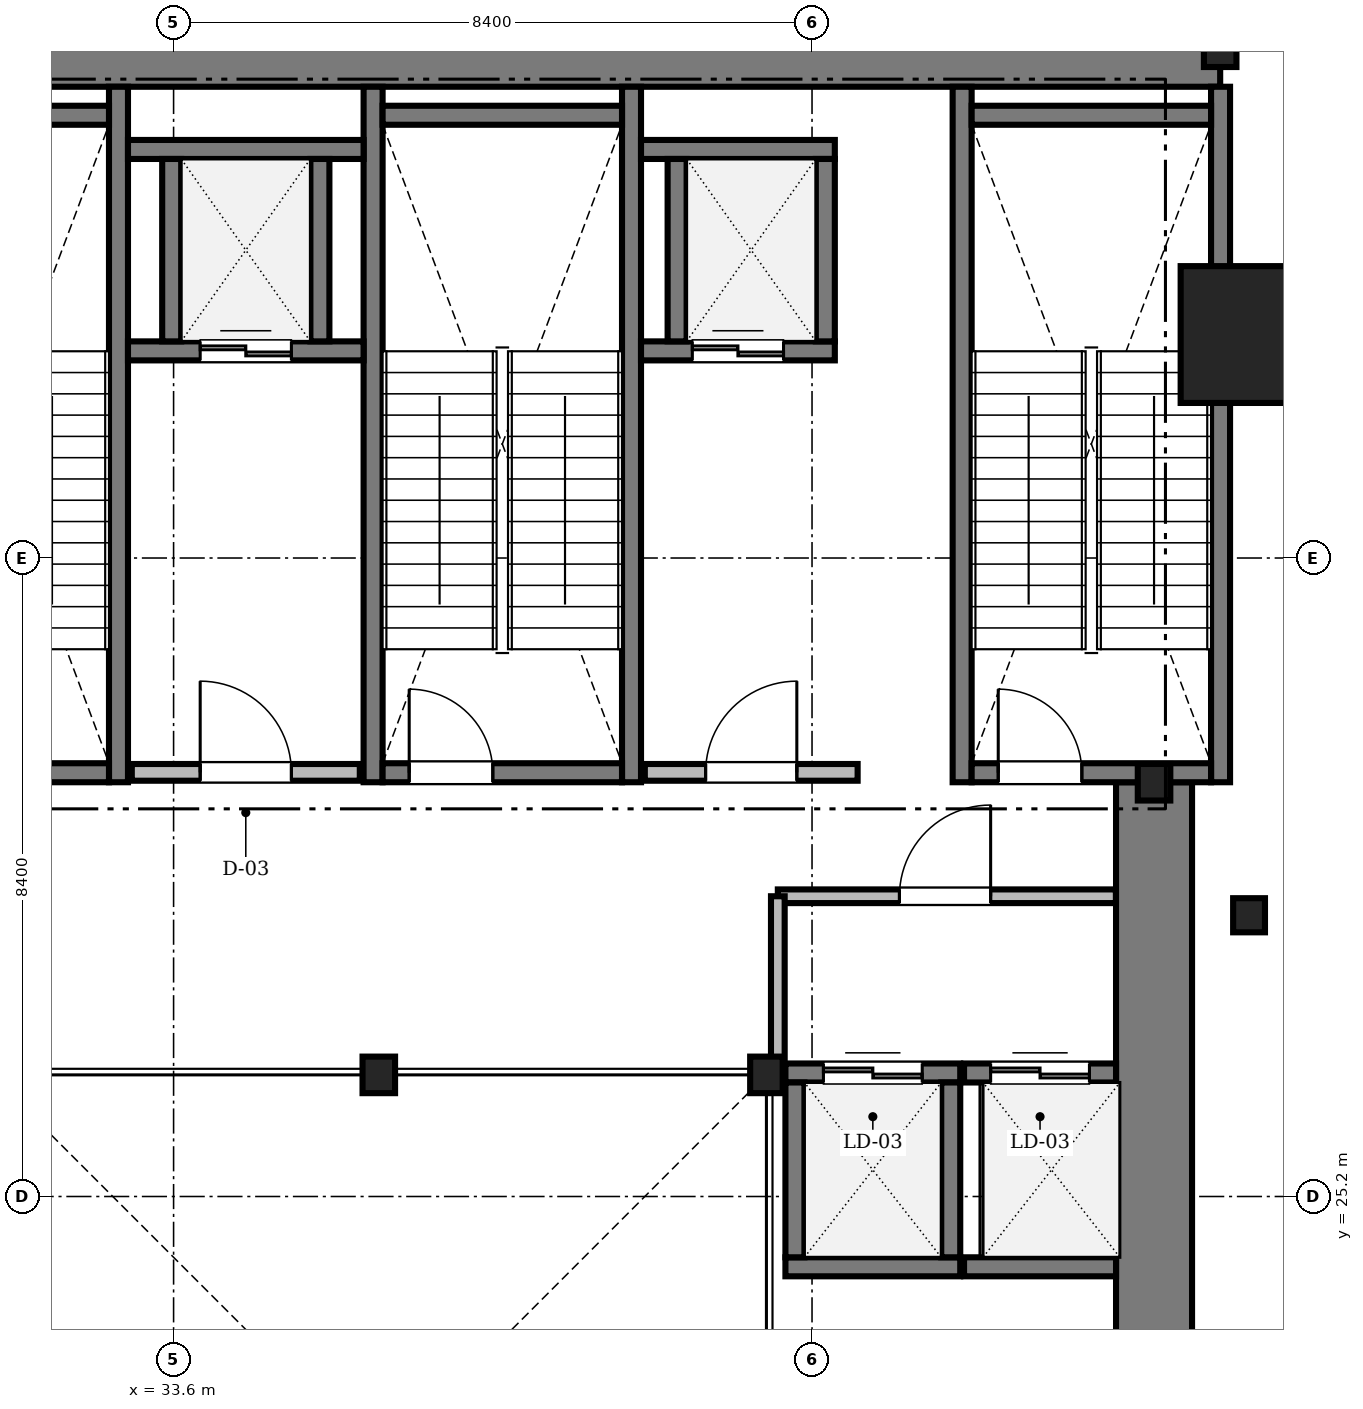
"""IFC4 building model, lengths in metres.
Left out: names, types, materials, properties, quantities, classifications, styles, units other than length and angle.
Written with IfcOpenShell. Run it as: python <this file> out.ifc"""

import sys

from ifc_helpers import new_model, si_unit, direction, frame, frame_2d, origin, origin_2d, place, context, subcontext, project, spatial, rectangle, i_section, extrude, source, transform, mapped, element, fill, save


model = new_model("IFC4")
c1 = context("Model", 3, precision=1e-05, world=origin(), true_north=direction((0.0, 1.0)))
c2 = subcontext(c1, "Body", "Model", "MODEL_VIEW")
j1 = project(units=[si_unit("LENGTHUNIT", "METRE"), si_unit("PLANEANGLEUNIT", "RADIAN")], contexts=[c1])
p1 = place(None, origin())
s1 = spatial("IfcSite", under=j1, at=p1, CompositionType="ELEMENT")
p2 = place(p1, origin())
s2 = spatial("IfcBuilding", under=s1, at=p2, CompositionType="ELEMENT")
p3 = place(p2, frame((0.0, 0.0, 93.3)))
s3 = spatial("IfcBuildingStorey", under=s2, at=p3, CompositionType="ELEMENT", Elevation=93.3)
m1 = source(origin(), c2, "Body", "SweptSolid", [
    extrude(rectangle(XDim=17.52, YDim=1.0, at=frame_2d((8.76, 0.0))), origin(), (0.0, 0.0, 1.0), 4.75),
])
p4 = place(p3, frame((29.85, 40.3, 0.0), z_axis=(0.0, 0.0, 1.0), x_axis=(1.0, 0.0, 0.0)))
e1 = element("IfcWall", 1, at=p4, inside=s3, PredefinedType="SHEAR", context=c2, shape_type="MappedRepresentation", body=[
    mapped(m1, transform((0.0, 0.0, 0.0), scale=1.0)),
])
m2 = source(origin(), c2, "Body", "SweptSolid", [
    extrude(rectangle(XDim=13.15, YDim=1.0, at=frame_2d((6.575, 0.0))), origin(), (0.0, 0.0, 1.0), 4.75),
])
p5 = place(p3, frame((46.5, 17.5, 0.0), z_axis=(0.0, 0.0, 1.0), x_axis=(0.0, 1.0, 0.0)))
e2 = element("IfcWall", 2, at=p5, inside=s3, PredefinedType="SHEAR", context=c2, shape_type="MappedRepresentation", body=[
    mapped(m2, transform((0.0, 0.0, 0.0), scale=1.0)),
])
m3 = source(origin(), c2, "Body", "SweptSolid", [
    extrude(i_section(OverallWidth=0.428, OverallDepth=0.481, WebThickness=0.04, FlangeThickness=0.063, FilletRadius=0.015, at=origin_2d()), origin(), (0.0, 0.0, 1.0), 4.75),
])
for number, where, z_axis, x_axis in (
    (3, (41.4, 26.8, 0.0), (0.0, 0.0, 1.0), (1.0, 0.0, 0.0)),
    (4, (36.3, 26.8, 0.0), (0.0, 0.0, 1.0), (1.0, 0.0, 0.0)),
    (5, (46.5, 30.65, 0.0), (0.0, 0.0, 1.0), (1.0, 0.0, 0.0)),
    (6, (47.37, 40.3, 0.0), (0.0, 0.0, 1.0), (1.0, 0.0, 0.0)),
):
    element("IfcColumn", number, at=place(p3, frame(where, z_axis=z_axis, x_axis=x_axis)), inside=s3, PredefinedType="COLUMN", context=c2, shape_type="MappedRepresentation", body=[
        mapped(m3, transform((0.0, 0.0, 0.0), scale=1.0)),
    ])
m4 = source(origin(), c2, "Body", "SweptSolid", [
    extrude(rectangle(XDim=1.8, YDim=1.8, at=origin_2d()), origin(), (0.0, 0.0, 1.0), 6.543),
])
p6 = place(p3, frame((47.75, 36.54, 0.0), z_axis=(0.687744647911, 0.0, 0.725952683906), x_axis=(0.0, 1.0, 0.0)))
e7 = element("IfcColumn", 7, at=p6, inside=s3, PredefinedType="COLUMN", context=c2, shape_type="MappedRepresentation", body=[
    mapped(m4, transform((0.0, 0.0, 0.0), scale=1.0)),
])
m5 = source(origin(), c2, "Body", "SweptSolid", [
    extrude(i_section(OverallWidth=0.419, OverallDepth=0.449, WebThickness=0.031, FlangeThickness=0.048, FilletRadius=0.015, at=origin_2d()), origin(), (0.0, 0.0, 1.0), 6.543),
])
p7 = place(p3, frame((47.75, 28.9, 0.0), z_axis=(0.687744647911, 0.0, 0.725952683906), x_axis=(0.0, 1.0, 0.0)))
e8 = element("IfcColumn", 8, at=p7, inside=s3, PredefinedType="COLUMN", context=c2, shape_type="MappedRepresentation", body=[
    mapped(m5, transform((0.0, 0.0, 0.0), scale=1.0)),
])
m6 = source(origin(), c2, "Body", "SweptSolid", [
    extrude(rectangle(XDim=9.15, YDim=0.25, at=frame_2d((4.575, 0.0))), origin(), (0.0, 0.0, 1.0), 5.2),
])
p8 = place(p3, frame((32.875, 30.65, 0.0), z_axis=(0.0, 0.0, 1.0), x_axis=(0.0, 1.0, 0.0)))
e9 = element("IfcWall", 9, at=p8, inside=s3, PredefinedType="SOLIDWALL", context=c2, shape_type="MappedRepresentation", body=[
    mapped(m6, transform((0.0, 0.0, 0.0), scale=1.0)),
])
m7 = source(origin(), c2, "Body", "SweptSolid", [
    extrude(rectangle(XDim=3.15, YDim=0.25, at=frame_2d((1.575, 0.0))), origin(), (0.0, 0.0, 1.0), 5.2),
])
p9 = place(p3, frame((29.6, 39.425, 0.0), z_axis=(0.0, 0.0, 1.0), x_axis=(1.0, 0.0, 0.0)))
e10 = element("IfcWall", 10, at=p9, inside=s3, PredefinedType="SOLIDWALL", context=c2, shape_type="MappedRepresentation", body=[
    mapped(m7, transform((0.0, 0.0, 0.0), scale=1.0)),
])
p10 = place(p3, frame((29.6, 30.775, 0.0), z_axis=(0.0, 0.0, 1.0), x_axis=(1.0, 0.0, 0.0)))
e11 = element("IfcWall", 11, at=p10, inside=s3, PredefinedType="SOLIDWALL", context=c2, shape_type="MappedRepresentation", body=[
    mapped(m7, transform((0.0, 0.0, 0.0), scale=1.0)),
])
m8 = source(origin(), c2, "Body", "SweptSolid", [
    extrude(rectangle(XDim=1.1, YDim=2.2, at=frame_2d((0.55, 1.1))), frame((0.0, 0.135, 0.0), z_axis=(0.0, -1.0, 0.0), x_axis=(1.0, 0.0, 0.0)), (0.0, 0.0, 1.0), 0.27),
])
p11 = place(p10, frame((0.35, 0.0, 0.0)))
e12 = element("IfcOpeningElement", 12, at=p11, cuts=e11, PredefinedType="OPENING", context=c2, shape_type="MappedRepresentation", body=[
    mapped(m8, transform((0.0, 0.0, 0.0), scale=1.0)),
])
for number, where, z_axis, x_axis in (
    (13, (36.225, 30.65, 0.0), (0.0, 0.0, 1.0), (0.0, 1.0, 0.0)),
    (14, (39.625, 30.65, 0.0), (0.0, 0.0, 1.0), (0.0, 1.0, 0.0)),
):
    element("IfcWall", number, at=place(p3, frame(where, z_axis=z_axis, x_axis=x_axis)), inside=s3, PredefinedType="SOLIDWALL", context=c2, shape_type="MappedRepresentation", body=[
        mapped(m6, transform((0.0, 0.0, 0.0), scale=1.0)),
    ])
p12 = place(p3, frame((36.35, 39.425, 0.0), z_axis=(0.0, 0.0, 1.0), x_axis=(1.0, 0.0, 0.0)))
e15 = element("IfcWall", 15, at=p12, inside=s3, PredefinedType="SOLIDWALL", context=c2, shape_type="MappedRepresentation", body=[
    mapped(m7, transform((0.0, 0.0, 0.0), scale=1.0)),
])
p13 = place(p3, frame((36.35, 30.775, 0.0), z_axis=(0.0, 0.0, 1.0), x_axis=(1.0, 0.0, 0.0)))
e16 = element("IfcWall", 16, at=p13, inside=s3, PredefinedType="SOLIDWALL", context=c2, shape_type="MappedRepresentation", body=[
    mapped(m7, transform((0.0, 0.0, 0.0), scale=1.0)),
])
p14 = place(p13, frame((0.35, 0.0, 0.0)))
e17 = element("IfcOpeningElement", 17, at=p14, cuts=e16, PredefinedType="OPENING", context=c2, shape_type="MappedRepresentation", body=[
    mapped(m8, transform((0.0, 0.0, 0.0), scale=1.0)),
])
for number, where, z_axis, x_axis in (
    (18, (43.975, 30.65, 0.0), (0.0, 0.0, 1.0), (0.0, 1.0, 0.0)),
    (19, (47.375, 30.65, 0.0), (0.0, 0.0, 1.0), (0.0, 1.0, 0.0)),
):
    element("IfcWall", number, at=place(p3, frame(where, z_axis=z_axis, x_axis=x_axis)), inside=s3, PredefinedType="SOLIDWALL", context=c2, shape_type="MappedRepresentation", body=[
        mapped(m6, transform((0.0, 0.0, 0.0), scale=1.0)),
    ])
p15 = place(p3, frame((44.1, 39.425, 0.0), z_axis=(0.0, 0.0, 1.0), x_axis=(1.0, 0.0, 0.0)))
e20 = element("IfcWall", 20, at=p15, inside=s3, PredefinedType="SOLIDWALL", context=c2, shape_type="MappedRepresentation", body=[
    mapped(m7, transform((0.0, 0.0, 0.0), scale=1.0)),
])
p16 = place(p3, frame((44.1, 30.775, 0.0), z_axis=(0.0, 0.0, 1.0), x_axis=(1.0, 0.0, 0.0)))
e21 = element("IfcWall", 21, at=p16, inside=s3, PredefinedType="SOLIDWALL", context=c2, shape_type="MappedRepresentation", body=[
    mapped(m7, transform((0.0, 0.0, 0.0), scale=1.0)),
])
p17 = place(p16, frame((0.35, 0.0, 0.0)))
e22 = element("IfcOpeningElement", 22, at=p17, cuts=e21, PredefinedType="OPENING", context=c2, shape_type="MappedRepresentation", body=[
    mapped(m8, transform((0.0, 0.0, 0.0), scale=1.0)),
])
m9 = source(origin(), c2, "Body", "SweptSolid", [
    extrude(rectangle(XDim=3.0, YDim=0.22, at=frame_2d((1.5, 0.0))), origin(), (0.0, 0.0, 1.0), 4.75),
])
p18 = place(p3, frame((33.05, 30.78, 0.0), z_axis=(0.0, 0.0, 1.0), x_axis=(1.0, 0.0, 0.0)))
e23 = element("IfcWall", 23, at=p18, inside=s3, PredefinedType="SOLIDWALL", context=c2, shape_type="MappedRepresentation", body=[
    mapped(m9, transform((0.0, 0.0, 0.0), scale=1.0)),
])
m10 = source(origin(), c2, "Body", "SweptSolid", [
    extrude(rectangle(XDim=1.2, YDim=2.2, at=frame_2d((0.6, 1.1))), frame((0.0, 0.12, 0.0), z_axis=(0.0, -1.0, 0.0), x_axis=(1.0, 0.0, 0.0)), (0.0, 0.0, 1.0), 0.24),
])
p19 = place(p18, frame((0.9, 0.0, 0.0)))
e24 = element("IfcOpeningElement", 24, at=p19, cuts=e23, PredefinedType="OPENING", context=c2, shape_type="MappedRepresentation", body=[
    mapped(m10, transform((0.0, 0.0, 0.0), scale=1.0)),
])
m11 = source(origin(), c2, "Body", "SweptSolid", [
    extrude(rectangle(XDim=2.8, YDim=0.22, at=frame_2d((1.4, 0.0))), origin(), (0.0, 0.0, 1.0), 4.75),
])
p20 = place(p3, frame((39.8, 30.78, 0.0), z_axis=(0.0, 0.0, 1.0), x_axis=(1.0, 0.0, 0.0)))
e25 = element("IfcWall", 25, at=p20, inside=s3, PredefinedType="SOLIDWALL", context=c2, shape_type="MappedRepresentation", body=[
    mapped(m11, transform((0.0, 0.0, 0.0), scale=1.0)),
])
p21 = place(p20, frame((0.8, 0.0, 0.0)))
e26 = element("IfcOpeningElement", 26, at=p21, cuts=e25, PredefinedType="OPENING", context=c2, shape_type="MappedRepresentation", body=[
    mapped(m10, transform((0.0, 0.0, 0.0), scale=1.0)),
])
m12 = source(origin(), c2, "Body", "SweptSolid", [
    extrude(rectangle(XDim=3.1, YDim=0.25, at=frame_2d((1.55, 0.0))), origin(), (0.0, 0.0, 1.0), 4.75),
])
p22 = place(p3, frame((33.0, 36.325, 0.0), z_axis=(0.0, 0.0, 1.0), x_axis=(1.0, 0.0, 0.0)))
e27 = element("IfcWall", 27, at=p22, inside=s3, PredefinedType="SOLIDWALL", context=c2, shape_type="MappedRepresentation", body=[
    mapped(m12, transform((0.0, 0.0, 0.0), scale=1.0)),
])
m13 = source(origin(), c2, "Body", "SweptSolid", [
    extrude(rectangle(XDim=1.2, YDim=2.25, at=frame_2d((0.6, 1.125))), frame((0.0, 0.135, 0.0), z_axis=(0.0, -1.0, 0.0), x_axis=(1.0, 0.0, 0.0)), (0.0, 0.0, 1.0), 0.27),
])
p23 = place(p22, frame((0.95, 0.0, 0.0)))
e28 = element("IfcOpeningElement", 28, at=p23, cuts=e27, PredefinedType="OPENING", context=c2, shape_type="MappedRepresentation", body=[
    mapped(m13, transform((0.0, 0.0, 0.0), scale=1.0)),
])
p24 = place(p3, frame((33.0, 38.975, 0.0), z_axis=(0.0, 0.0, 1.0), x_axis=(1.0, 0.0, 0.0)))
e29 = element("IfcWall", 29, at=p24, inside=s3, PredefinedType="SOLIDWALL", context=c2, shape_type="MappedRepresentation", body=[
    mapped(m12, transform((0.0, 0.0, 0.0), scale=1.0)),
])
m14 = source(origin(), c2, "Body", "SweptSolid", [
    extrude(rectangle(XDim=2.4, YDim=0.25, at=frame_2d((1.2, 0.0))), origin(), (0.0, 0.0, 1.0), 4.75),
])
for number, where, z_axis, x_axis in (
    (30, (33.575, 36.45, 0.0), (0.0, 0.0, 1.0), (0.0, 1.0, 0.0)),
    (31, (35.525, 36.45, 0.0), (0.0, 0.0, 1.0), (0.0, 1.0, 0.0)),
):
    element("IfcWall", number, at=place(p3, frame(where, z_axis=z_axis, x_axis=x_axis)), inside=s3, PredefinedType="SOLIDWALL", context=c2, shape_type="MappedRepresentation", body=[
        mapped(m14, transform((0.0, 0.0, 0.0), scale=1.0)),
    ])
m15 = source(origin(), c2, "Body", "SweptSolid", [
    extrude(rectangle(XDim=2.55, YDim=0.25, at=frame_2d((1.275, 0.0))), origin(), (0.0, 0.0, 1.0), 4.75),
])
p25 = place(p3, frame((39.75, 36.325, 0.0), z_axis=(0.0, 0.0, 1.0), x_axis=(1.0, 0.0, 0.0)))
e32 = element("IfcWall", 32, at=p25, inside=s3, PredefinedType="SOLIDWALL", context=c2, shape_type="MappedRepresentation", body=[
    mapped(m15, transform((0.0, 0.0, 0.0), scale=1.0)),
])
p26 = place(p25, frame((0.675, 0.0, 0.0)))
e33 = element("IfcOpeningElement", 33, at=p26, cuts=e32, PredefinedType="OPENING", context=c2, shape_type="MappedRepresentation", body=[
    mapped(m13, transform((0.0, 0.0, 0.0), scale=1.0)),
])
p27 = place(p3, frame((39.75, 38.975, 0.0), z_axis=(0.0, 0.0, 1.0), x_axis=(1.0, 0.0, 0.0)))
e34 = element("IfcWall", 34, at=p27, inside=s3, PredefinedType="SOLIDWALL", context=c2, shape_type="MappedRepresentation", body=[
    mapped(m15, transform((0.0, 0.0, 0.0), scale=1.0)),
])
for number, where, z_axis, x_axis in (
    (35, (40.225, 36.45, 0.0), (0.0, 0.0, 1.0), (0.0, 1.0, 0.0)),
    (36, (42.175, 36.45, 0.0), (0.0, 0.0, 1.0), (0.0, 1.0, 0.0)),
):
    element("IfcWall", number, at=place(p3, frame(where, z_axis=z_axis, x_axis=x_axis)), inside=s3, PredefinedType="SOLIDWALL", context=c2, shape_type="MappedRepresentation", body=[
        mapped(m14, transform((0.0, 0.0, 0.0), scale=1.0)),
    ])
m16 = source(origin(), c2, "Body", "SweptSolid", [
    extrude(rectangle(XDim=2.3, YDim=0.25, at=frame_2d((1.15, 0.0))), origin(), (0.0, 0.0, 1.0), 4.75),
])
p28 = place(p3, frame((41.65, 24.275, 0.0), z_axis=(0.0, 0.0, 1.0), x_axis=(1.0, 0.0, 0.0)))
e37 = element("IfcWall", 37, at=p28, inside=s3, PredefinedType="SOLIDWALL", context=c2, shape_type="MappedRepresentation", body=[
    mapped(m16, transform((0.0, 0.0, 0.0), scale=1.0)),
])
p29 = place(p3, frame((41.65, 26.825, 0.0), z_axis=(0.0, 0.0, 1.0), x_axis=(1.0, 0.0, 0.0)))
e38 = element("IfcWall", 38, at=p29, inside=s3, PredefinedType="SOLIDWALL", context=c2, shape_type="MappedRepresentation", body=[
    mapped(m16, transform((0.0, 0.0, 0.0), scale=1.0)),
])
m17 = source(origin(), c2, "Body", "SweptSolid", [
    extrude(rectangle(XDim=1.3, YDim=2.3, at=frame_2d((0.65, 1.15))), frame((0.0, 0.135, 0.0), z_axis=(0.0, -1.0, 0.0), x_axis=(1.0, 0.0, 0.0)), (0.0, 0.0, 1.0), 0.27),
])
p30 = place(p29, frame((0.5, 0.0, 0.0)))
e39 = element("IfcOpeningElement", 39, at=p30, cuts=e38, PredefinedType="OPENING", context=c2, shape_type="MappedRepresentation", body=[
    mapped(m17, transform((0.0, 0.0, 0.0), scale=1.0)),
])
for number, where, z_axis, x_axis in (
    (40, (41.775, 24.4, 0.0), (0.0, 0.0, 1.0), (0.0, 1.0, 0.0)),
    (41, (43.825, 24.4, 0.0), (0.0, 0.0, 1.0), (0.0, 1.0, 0.0)),
):
    element("IfcWall", number, at=place(p3, frame(where, z_axis=z_axis, x_axis=x_axis)), inside=s3, PredefinedType="SOLIDWALL", context=c2, shape_type="MappedRepresentation", body=[
        mapped(m16, transform((0.0, 0.0, 0.0), scale=1.0)),
    ])
m18 = source(origin(), c2, "Body", "SweptSolid", [
    extrude(rectangle(XDim=2.0, YDim=0.25, at=frame_2d((1.0, 0.0))), origin(), (0.0, 0.0, 1.0), 4.75),
])
p31 = place(p3, frame((44.0, 24.275, 0.0), z_axis=(0.0, 0.0, 1.0), x_axis=(1.0, 0.0, 0.0)))
e42 = element("IfcWall", 42, at=p31, inside=s3, PredefinedType="SOLIDWALL", context=c2, shape_type="MappedRepresentation", body=[
    mapped(m18, transform((0.0, 0.0, 0.0), scale=1.0)),
])
p32 = place(p3, frame((44.0, 26.825, 0.0), z_axis=(0.0, 0.0, 1.0), x_axis=(1.0, 0.0, 0.0)))
e43 = element("IfcWall", 43, at=p32, inside=s3, PredefinedType="SOLIDWALL", context=c2, shape_type="MappedRepresentation", body=[
    mapped(m18, transform((0.0, 0.0, 0.0), scale=1.0)),
])
p33 = place(p32, frame((0.35, 0.0, 0.0)))
e44 = element("IfcOpeningElement", 44, at=p33, cuts=e43, PredefinedType="OPENING", context=c2, shape_type="MappedRepresentation", body=[
    mapped(m17, transform((0.0, 0.0, 0.0), scale=1.0)),
])
m19 = source(origin(), c2, "Body", "SweptSolid", [
    extrude(rectangle(XDim=4.448, YDim=0.18, at=frame_2d((2.224, 0.0))), origin(), (0.0, 0.0, 1.0), 4.382),
])
p34 = place(p3, frame((41.55, 29.15, 0.0), z_axis=(0.0, 0.0, 1.0), x_axis=(1.0, 0.0, 0.0)))
e45 = element("IfcWall", 45, at=p34, inside=s3, PredefinedType="PARTITIONING", context=c2, shape_type="MappedRepresentation", body=[
    mapped(m19, transform((0.0, 0.0, 0.0), scale=1.0)),
])
m20 = source(origin(), c2, "Body", "SweptSolid", [
    extrude(rectangle(XDim=1.2, YDim=2.2, at=frame_2d((0.6, 1.1))), frame((0.0, 0.1, 0.0), z_axis=(0.0, -1.0, 0.0), x_axis=(1.0, 0.0, 0.0)), (0.0, 0.0, 1.0), 0.2),
])
p35 = place(p34, frame((1.6, 0.0, 0.0)))
e46 = element("IfcOpeningElement", 46, at=p35, cuts=e45, PredefinedType="OPENING", context=c2, shape_type="MappedRepresentation", body=[
    mapped(m20, transform((0.0, 0.0, 0.0), scale=1.0)),
])
m21 = source(origin(), c2, "Body", "SweptSolid", [
    extrude(rectangle(XDim=2.35, YDim=0.18, at=frame_2d((1.175, 0.0))), origin(), (0.0, 0.0, 1.0), 4.382),
])
p36 = place(p3, frame((41.55, 26.8, 0.0), z_axis=(0.0, 0.0, 1.0), x_axis=(0.0, 1.0, 0.0)))
e47 = element("IfcWall", 47, at=p36, inside=s3, PredefinedType="PARTITIONING", context=c2, shape_type="MappedRepresentation", body=[
    mapped(m21, transform((0.0, 0.0, 0.0), scale=1.0)),
])
m22 = source(origin(), c2, "Body", "SweptSolid", [
    extrude(rectangle(XDim=1.1, YDim=2.2, at=frame_2d((0.55, 1.1))), frame((0.0, 0.025, 0.0), z_axis=(0.0, -1.0, 0.0), x_axis=(1.0, 0.0, 0.0)), (0.0, 0.0, 1.0), 0.05),
])
p37 = place(p14, origin())
e48 = element("IfcDoor", 48, at=p37, inside=s3, OperationType="SINGLE_SWING_LEFT", PredefinedType="DOOR", context=c2, shape_type="MappedRepresentation", body=[
    mapped(m22, transform((0.0, 0.0, 0.0), scale=1.0)),
])
fill(e17, e48)
p38 = place(p17, origin())
e49 = element("IfcDoor", 49, at=p38, inside=s3, OperationType="SINGLE_SWING_LEFT", PredefinedType="DOOR", context=c2, shape_type="MappedRepresentation", body=[
    mapped(m22, transform((0.0, 0.0, 0.0), scale=1.0)),
])
fill(e22, e49)
m23 = source(origin(), c2, "Body", "SweptSolid", [
    extrude(rectangle(XDim=1.2, YDim=2.2, at=frame_2d((0.6, 1.1))), frame((0.0, 0.025, 0.0), z_axis=(0.0, -1.0, 0.0), x_axis=(1.0, 0.0, 0.0)), (0.0, 0.0, 1.0), 0.05),
])
p39 = place(p19, origin())
e50 = element("IfcDoor", 50, at=p39, inside=s3, OperationType="SINGLE_SWING_LEFT", PredefinedType="DOOR", context=c2, shape_type="MappedRepresentation", body=[
    mapped(m23, transform((0.0, 0.0, 0.0), scale=1.0)),
])
fill(e24, e50)
p40 = place(p21, origin())
e51 = element("IfcDoor", 51, at=p40, inside=s3, OperationType="SINGLE_SWING_RIGHT", PredefinedType="DOOR", context=c2, shape_type="MappedRepresentation", body=[
    mapped(m23, transform((0.0, 0.0, 0.0), scale=1.0)),
])
fill(e26, e51)
m24 = source(origin(), c2, "Body", "SweptSolid", [
    extrude(rectangle(XDim=1.2, YDim=2.25, at=frame_2d((0.6, 1.125))), frame((0.0, 0.025, 0.0), z_axis=(0.0, -1.0, 0.0), x_axis=(1.0, 0.0, 0.0)), (0.0, 0.0, 1.0), 0.05),
])
p41 = place(p23, origin())
e52 = element("IfcDoor", 52, at=p41, inside=s3, OperationType="DOUBLE_DOOR_SLIDING", PredefinedType="DOOR", context=c2, shape_type="MappedRepresentation", body=[
    mapped(m24, transform((0.0, 0.0, 0.0), scale=1.0)),
])
fill(e28, e52)
p42 = place(p26, origin())
e53 = element("IfcDoor", 53, at=p42, inside=s3, OperationType="DOUBLE_DOOR_SLIDING", PredefinedType="DOOR", context=c2, shape_type="MappedRepresentation", body=[
    mapped(m24, transform((0.0, 0.0, 0.0), scale=1.0)),
])
fill(e33, e53)
m25 = source(origin(), c2, "Body", "SweptSolid", [
    extrude(rectangle(XDim=1.3, YDim=2.3, at=frame_2d((0.65, 1.15))), frame((0.0, 0.025, 0.0), z_axis=(0.0, -1.0, 0.0), x_axis=(1.0, 0.0, 0.0)), (0.0, 0.0, 1.0), 0.05),
])
p43 = place(p30, origin())
e54 = element("IfcDoor", 54, at=p43, inside=s3, OperationType="DOUBLE_DOOR_SLIDING", PredefinedType="DOOR", context=c2, shape_type="MappedRepresentation", body=[
    mapped(m25, transform((0.0, 0.0, 0.0), scale=1.0)),
])
fill(e39, e54)
p44 = place(p33, origin())
e55 = element("IfcDoor", 55, at=p44, inside=s3, OperationType="DOUBLE_DOOR_SLIDING", PredefinedType="DOOR", context=c2, shape_type="MappedRepresentation", body=[
    mapped(m25, transform((0.0, 0.0, 0.0), scale=1.0)),
])
fill(e44, e55)
p45 = place(p35, origin())
e56 = element("IfcDoor", 56, at=p45, inside=s3, OperationType="SINGLE_SWING_RIGHT", PredefinedType="DOOR", context=c2, shape_type="MappedRepresentation", body=[
    mapped(m23, transform((0.0, 0.0, 0.0), scale=1.0)),
])
fill(e46, e56)
save(model, sys.argv[1])
